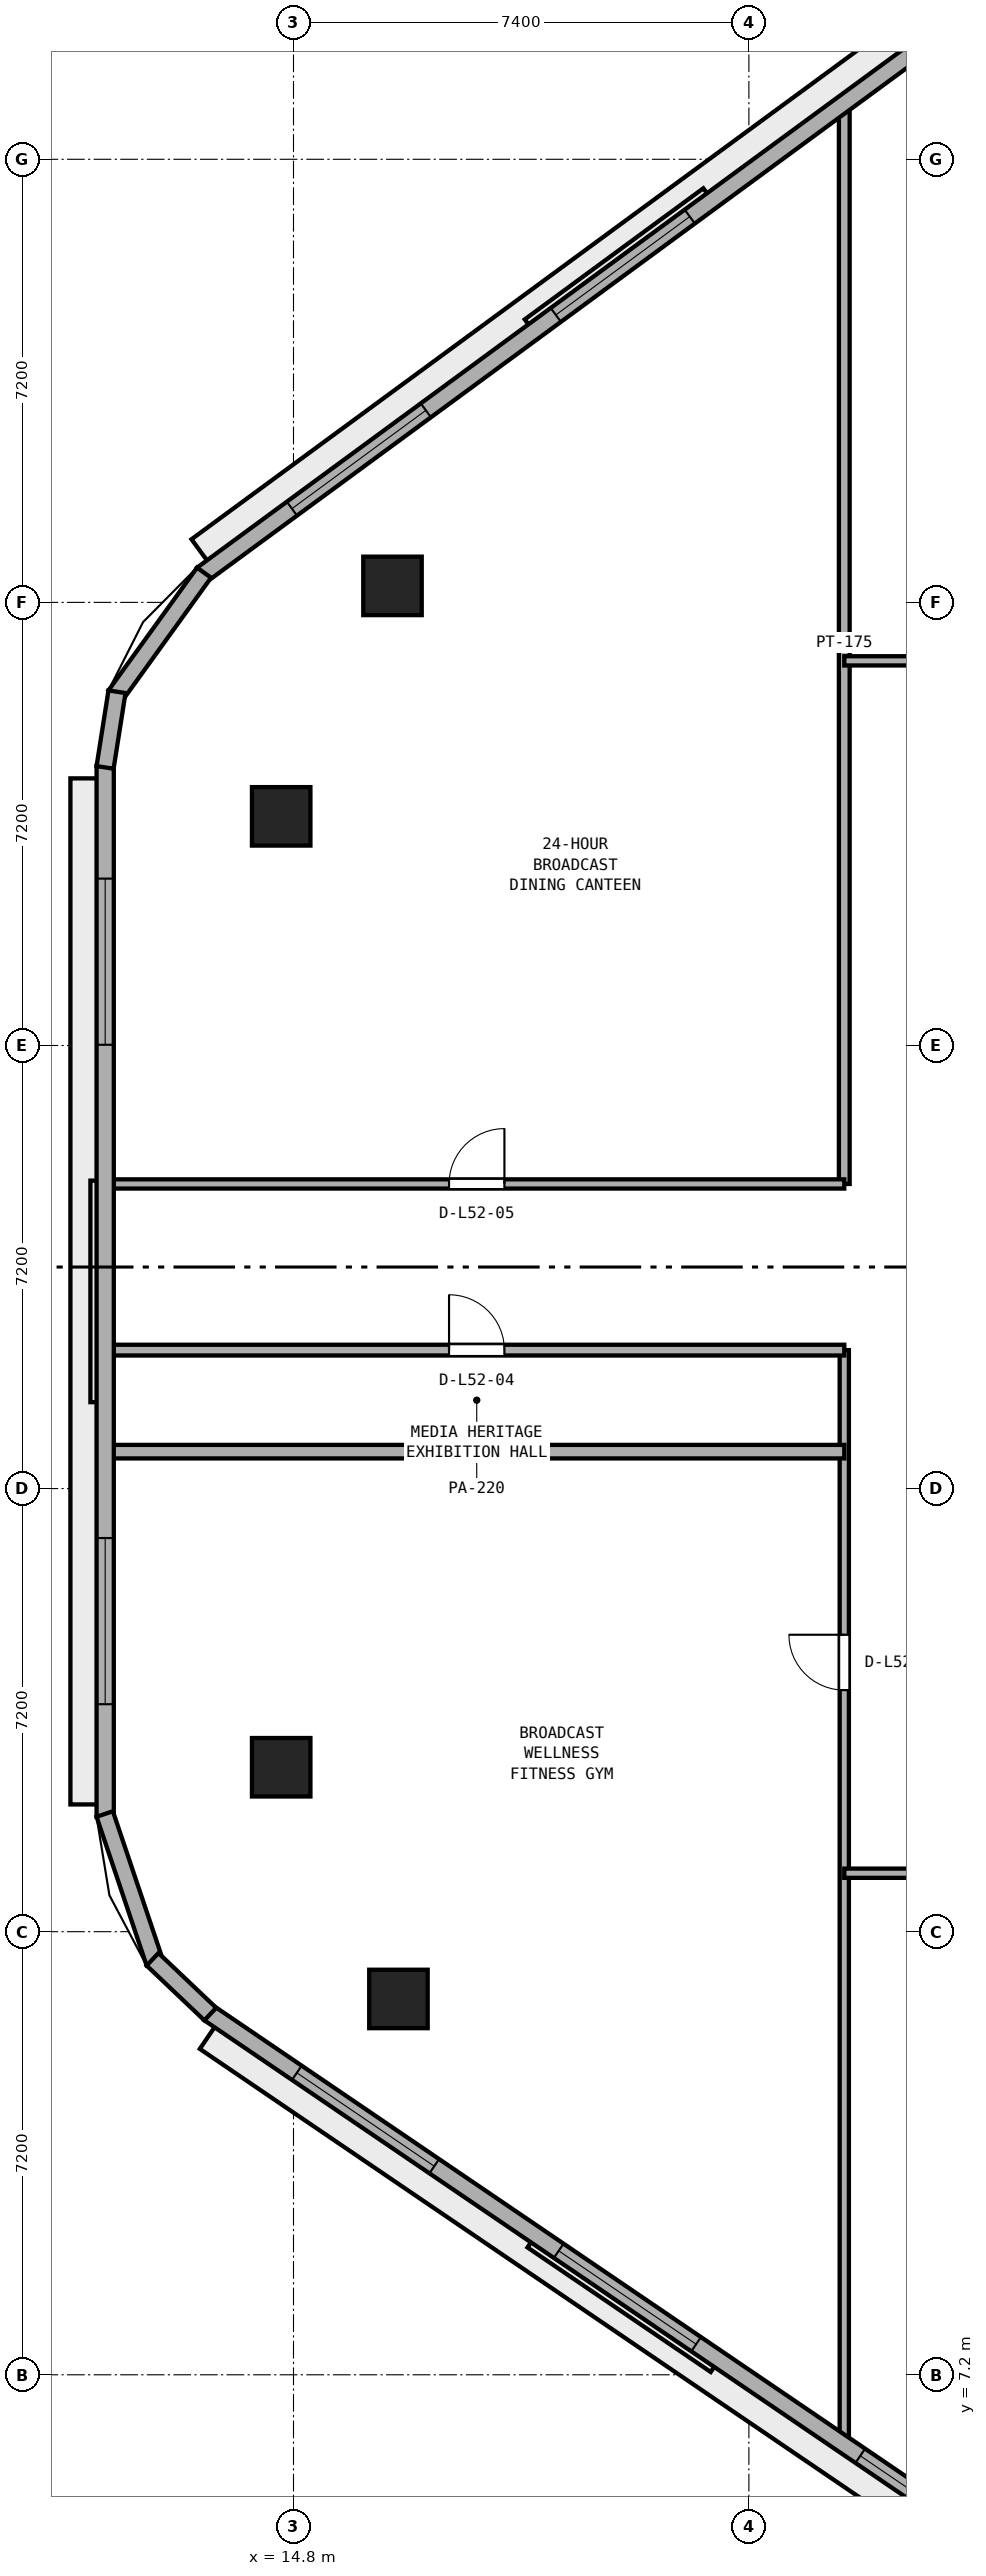
"""IFC4 building model, lengths in metres.
Left out: names, types, materials, properties, quantities, classifications, styles, units other than length and angle.
Written with IfcOpenShell. Run it as: python <this file> out.ifc"""

import sys

from ifc_helpers import new_model, si_unit, direction, frame, frame_2d, origin, origin_2d, place, context, subcontext, project, spatial, rectangle, extrude, element, fill, save


model = new_model("IFC4")
c1 = context("Model", 3, precision=1e-05, world=origin(), true_north=direction((0.0, 1.0)))
c2 = subcontext(c1, "Body", "Model", "MODEL_VIEW")
j1 = project(units=[si_unit("LENGTHUNIT", "METRE"), si_unit("PLANEANGLEUNIT", "RADIAN")], contexts=[c1])
p1 = place(None, origin())
s1 = spatial("IfcSite", under=j1, at=p1, CompositionType="ELEMENT")
p2 = place(p1, origin())
s2 = spatial("IfcBuilding", under=s1, at=p2, CompositionType="ELEMENT")
p3 = place(p2, frame((0.0, 0.0, 204.8)))
s3 = spatial("IfcBuildingStorey", under=s2, at=p3, CompositionType="ELEMENT", Elevation=204.8)
for number, where, z_axis, x_axis in (
    (1, (16.409, 36.268, 0.0), (0.0, 0.0, 1.0), (1.0, 0.0, 0.0)),
    (2, (14.6, 32.523, 0.0), (0.0, 0.0, 1.0), (1.0, 0.0, 0.0)),
    (3, (14.6, 17.072, 0.0), (0.0, 0.0, 1.0), (1.0, 0.0, 0.0)),
    (4, (16.505, 13.307, 0.0), (0.0, 0.0, 1.0), (1.0, 0.0, 0.0)),
):
    element("IfcColumn", number, at=place(p3, frame(where, z_axis=z_axis, x_axis=x_axis)), inside=s3, PredefinedType="COLUMN", context=c2, shape_type="SweptSolid", body=[
        extrude(rectangle(XDim=0.95, YDim=0.95, at=origin_2d()), origin(), (0.0, 0.0, 1.0), 3.8),
    ])
p4 = place(p3, frame((23.75, 6.031, 0.0), z_axis=(0.0, 0.0, 1.0), x_axis=(0.0, 1.0, 0.0)))
e5 = element("IfcWall", 5, at=p4, inside=s3, PredefinedType="PARTITIONING", context=c2, shape_type="SweptSolid", body=[
    extrude(rectangle(XDim=17.819, YDim=0.15, at=frame_2d((8.91, 0.0))), origin(), (0.0, 0.0, 1.0), 3.54),
])
p5 = place(p4, frame((12.294, 0.0, 0.0)))
e6 = element("IfcOpeningElement", 6, at=p5, cuts=e5, PredefinedType="OPENING", context=c2, shape_type="SweptSolid", body=[
    extrude(rectangle(XDim=0.9, YDim=2.1, at=frame_2d((0.45, 1.05))), frame((0.0, 0.085, 0.0), z_axis=(0.0, -1.0, 0.0), x_axis=(1.0, 0.0, 0.0)), (0.0, 0.0, 1.0), 0.17),
])
p6 = place(p3, frame((23.75, 26.55, 0.0), z_axis=(0.0, 0.0, 1.0), x_axis=(0.0, 1.0, 0.0)))
e7 = element("IfcWall", 7, at=p6, inside=s3, PredefinedType="PARTITIONING", context=c2, shape_type="SweptSolid", body=[
    extrude(rectangle(XDim=17.596, YDim=0.175, at=frame_2d((8.798, 0.0))), origin(), (0.0, 0.0, 1.0), 3.54),
])
p7 = place(p3, frame((23.75, 15.35, 0.0), z_axis=(0.0, 0.0, 1.0), x_axis=(1.0, 0.0, 0.0)))
e8 = element("IfcWall", 8, at=p7, inside=s3, PredefinedType="PARTITIONING", context=c2, shape_type="SweptSolid", body=[
    extrude(rectangle(XDim=10.65, YDim=0.15, at=frame_2d((5.325, 0.0))), origin(), (0.0, 0.0, 1.0), 3.54),
])
p8 = place(p7, frame((4.875, 0.0, 0.0)))
e9 = element("IfcOpeningElement", 9, at=p8, cuts=e8, PredefinedType="OPENING", context=c2, shape_type="SweptSolid", body=[
    extrude(rectangle(XDim=0.9, YDim=2.1, at=frame_2d((0.45, 1.05))), frame((0.0, 0.085, 0.0), z_axis=(0.0, -1.0, 0.0), x_axis=(1.0, 0.0, 0.0)), (0.0, 0.0, 1.0), 0.17),
])
p9 = place(p3, frame((11.805, 22.2, 0.0), z_axis=(0.0, 0.0, 1.0), x_axis=(1.0, 0.0, 0.0)))
e10 = element("IfcWall", 10, at=p9, inside=s3, PredefinedType="PARTITIONING", context=c2, shape_type="SweptSolid", body=[
    extrude(rectangle(XDim=11.945, YDim=0.22, at=frame_2d((5.973, 0.0))), origin(), (0.0, 0.0, 1.0), 3.54),
])
p10 = place(p3, frame((11.805, 23.85, 0.0), z_axis=(0.0, 0.0, 1.0), x_axis=(1.0, 0.0, 0.0)))
e11 = element("IfcWall", 11, at=p10, inside=s3, PredefinedType="PARTITIONING", context=c2, shape_type="SweptSolid", body=[
    extrude(rectangle(XDim=11.945, YDim=0.175, at=frame_2d((5.973, 0.0))), origin(), (0.0, 0.0, 1.0), 3.54),
])
p11 = place(p10, frame((5.522, 0.0, 0.0)))
e12 = element("IfcOpeningElement", 12, at=p11, cuts=e11, PredefinedType="OPENING", context=c2, shape_type="SweptSolid", body=[
    extrude(rectangle(XDim=0.9, YDim=2.1, at=frame_2d((0.45, 1.05))), frame((0.0, 0.097, 0.0), z_axis=(0.0, -1.0, 0.0), x_axis=(1.0, 0.0, 0.0)), (0.0, 0.0, 1.0), 0.195),
])
p12 = place(p3, frame((11.805, 26.55, 0.0), z_axis=(0.0, 0.0, 1.0), x_axis=(1.0, 0.0, 0.0)))
e13 = element("IfcWall", 13, at=p12, inside=s3, PredefinedType="PARTITIONING", context=c2, shape_type="SweptSolid", body=[
    extrude(rectangle(XDim=11.945, YDim=0.15, at=frame_2d((5.973, 0.0))), origin(), (0.0, 0.0, 1.0), 3.54),
])
p13 = place(p12, frame((5.522, 0.0, 0.0)))
e14 = element("IfcOpeningElement", 14, at=p13, cuts=e13, PredefinedType="OPENING", context=c2, shape_type="SweptSolid", body=[
    extrude(rectangle(XDim=0.9, YDim=2.1, at=frame_2d((0.45, 1.05))), frame((0.0, 0.085, 0.0), z_axis=(0.0, -1.0, 0.0), x_axis=(1.0, 0.0, 0.0)), (0.0, 0.0, 1.0), 0.17),
])
p14 = place(p3, frame((23.75, 35.05, 0.0), z_axis=(0.0, 0.0, 1.0), x_axis=(1.0, 0.0, 0.0)))
e15 = element("IfcWall", 15, at=p14, inside=s3, PredefinedType="PARTITIONING", context=c2, shape_type="SweptSolid", body=[
    extrude(rectangle(XDim=26.5, YDim=0.15, at=frame_2d((13.25, 0.0))), origin(), (0.0, 0.0, 1.0), 3.54),
])
p15 = place(p14, frame((12.8, 0.0, 0.0)))
e16 = element("IfcOpeningElement", 16, at=p15, cuts=e15, PredefinedType="OPENING", context=c2, shape_type="SweptSolid", body=[
    extrude(rectangle(XDim=0.9, YDim=2.1, at=frame_2d((0.45, 1.05))), frame((0.0, 0.085, 0.0), z_axis=(0.0, -1.0, 0.0), x_axis=(1.0, 0.0, 0.0)), (0.0, 0.0, 1.0), 0.17),
])
p16 = place(p3, frame((26.986, 46.488, 0.0), z_axis=(0.0, 0.0, 1.0), x_axis=(-0.806097783211, -0.59178236194, 0.0)))
e17 = element("IfcWall", 17, at=p16, inside=s3, PredefinedType="STANDARD", context=c2, shape_type="SweptSolid", body=[
    extrude(rectangle(XDim=16.959, YDim=0.28, at=frame_2d((8.479, 0.0))), origin(), (0.0, 0.0, 1.0), 3.54),
])
p17 = place(p16, frame((7.129, 0.0, 0.9)))
e18 = element("IfcOpeningElement", 18, at=p17, cuts=e17, PredefinedType="OPENING", context=c2, shape_type="SweptSolid", body=[
    extrude(rectangle(XDim=2.7, YDim=1.75, at=frame_2d((1.35, 0.875))), frame((0.0, 0.15, 0.0), z_axis=(0.0, -1.0, 0.0), x_axis=(1.0, 0.0, 0.0)), (0.0, 0.0, 1.0), 0.3),
])
p18 = place(p16, frame((12.449, 0.0, 0.9)))
e19 = element("IfcOpeningElement", 19, at=p18, cuts=e17, PredefinedType="OPENING", context=c2, shape_type="SweptSolid", body=[
    extrude(rectangle(XDim=2.7, YDim=1.75, at=frame_2d((1.35, 0.875))), frame((0.0, 0.15, 0.0), z_axis=(0.0, -1.0, 0.0), x_axis=(1.0, 0.0, 0.0)), (0.0, 0.0, 1.0), 0.3),
])
p19 = place(p3, frame((11.74, 33.34, 0.0), z_axis=(0.0, 0.0, 1.0), x_axis=(0.0, -1.0, 0.0)))
e20 = element("IfcWall", 20, at=p19, inside=s3, PredefinedType="STANDARD", context=c2, shape_type="SweptSolid", body=[
    extrude(rectangle(XDim=17.073, YDim=0.28, at=frame_2d((8.536, 0.0))), origin(), (0.0, 0.0, 1.0), 3.54),
])
p20 = place(p19, frame((1.829, 0.0, 0.9)))
e21 = element("IfcOpeningElement", 21, at=p20, cuts=e20, PredefinedType="OPENING", context=c2, shape_type="SweptSolid", body=[
    extrude(rectangle(XDim=2.7, YDim=1.75, at=frame_2d((1.35, 0.875))), frame((0.0, 0.15, 0.0), z_axis=(0.0, -1.0, 0.0), x_axis=(1.0, 0.0, 0.0)), (0.0, 0.0, 1.0), 0.3),
])
p21 = place(p19, frame((12.544, 0.0, 0.9)))
e22 = element("IfcOpeningElement", 22, at=p21, cuts=e20, PredefinedType="OPENING", context=c2, shape_type="SweptSolid", body=[
    extrude(rectangle(XDim=2.7, YDim=1.75, at=frame_2d((1.35, 0.875))), frame((0.0, 0.15, 0.0), z_axis=(0.0, -1.0, 0.0), x_axis=(1.0, 0.0, 0.0)), (0.0, 0.0, 1.0), 0.3),
])
p22 = place(p3, frame((13.43, 13.075, 0.0), z_axis=(0.0, 0.0, 1.0), x_axis=(0.827025402003, -0.562164552815, 0.0)))
e23 = element("IfcWall", 23, at=p22, inside=s3, PredefinedType="STANDARD", context=c2, shape_type="SweptSolid", body=[
    extrude(rectangle(XDim=16.435, YDim=0.28, at=frame_2d((8.218, 0.0))), origin(), (0.0, 0.0, 1.0), 3.54),
])
p23 = place(p22, frame((1.722, 0.0, 0.9)))
e24 = element("IfcOpeningElement", 24, at=p23, cuts=e23, PredefinedType="OPENING", context=c2, shape_type="SweptSolid", body=[
    extrude(rectangle(XDim=2.7, YDim=1.75, at=frame_2d((1.35, 0.875))), frame((0.0, 0.15, 0.0), z_axis=(0.0, -1.0, 0.0), x_axis=(1.0, 0.0, 0.0)), (0.0, 0.0, 1.0), 0.3),
])
p24 = place(p22, frame((6.868, 0.0, 0.9)))
e25 = element("IfcOpeningElement", 25, at=p24, cuts=e23, PredefinedType="OPENING", context=c2, shape_type="SweptSolid", body=[
    extrude(rectangle(XDim=2.7, YDim=1.75, at=frame_2d((1.35, 0.875))), frame((0.0, 0.15, 0.0), z_axis=(0.0, -1.0, 0.0), x_axis=(1.0, 0.0, 0.0)), (0.0, 0.0, 1.0), 0.3),
])
p25 = place(p22, frame((12.793, 0.0, 0.9)))
e26 = element("IfcOpeningElement", 26, at=p25, cuts=e23, PredefinedType="OPENING", context=c2, shape_type="SweptSolid", body=[
    extrude(rectangle(XDim=2.7, YDim=1.75, at=frame_2d((1.35, 0.875))), frame((0.0, 0.15, 0.0), z_axis=(0.0, -1.0, 0.0), x_axis=(1.0, 0.0, 0.0)), (0.0, 0.0, 1.0), 0.3),
])
p26 = place(p3, frame((13.346, 36.483, 0.0), z_axis=(0.0, 0.0, 1.0), x_axis=(-0.585128091556, -0.810940883463, 0.0)))
e27 = element("IfcWall", 27, at=p26, inside=s3, PredefinedType="STANDARD", context=c2, shape_type="SweptSolid", body=[
    extrude(rectangle(XDim=2.46, YDim=0.28, at=frame_2d((1.23, 0.0))), origin(), (0.0, 0.0, 1.0), 3.54),
])
p27 = place(p3, frame((11.932, 34.548, 0.0), z_axis=(0.0, 0.0, 1.0), x_axis=(-0.155519443181, -0.987832831401, 0.0)))
e28 = element("IfcWall", 28, at=p27, inside=s3, PredefinedType="STANDARD", context=c2, shape_type="SweptSolid", body=[
    extrude(rectangle(XDim=1.245, YDim=0.28, at=frame_2d((0.623, 0.0))), origin(), (0.0, 0.0, 1.0), 3.54),
])
p28 = place(p3, frame((11.733, 16.312, 0.0), z_axis=(0.0, 0.0, 1.0), x_axis=(0.318924860995, -0.947780002447, 0.0)))
e29 = element("IfcWall", 29, at=p28, inside=s3, PredefinedType="STANDARD", context=c2, shape_type="SweptSolid", body=[
    extrude(rectangle(XDim=2.552, YDim=0.28, at=frame_2d((1.276, 0.0))), origin(), (0.0, 0.0, 1.0), 3.54),
])
p29 = place(p3, frame((12.51, 13.951, 0.0), z_axis=(0.0, 0.0, 1.0), x_axis=(0.725371815671, -0.688357268451, 0.0)))
e30 = element("IfcWall", 30, at=p29, inside=s3, PredefinedType="STANDARD", context=c2, shape_type="SweptSolid", body=[
    extrude(rectangle(XDim=1.293, YDim=0.28, at=frame_2d((0.646, 0.0))), origin(), (0.0, 0.0, 1.0), 3.54),
])
p30 = place(p5, origin())
e31 = element("IfcDoor", 31, at=p30, inside=s3, OperationType="SINGLE_SWING_RIGHT", PredefinedType="DOOR", context=c2, shape_type="SweptSolid", body=[
    extrude(rectangle(XDim=0.9, YDim=2.1, at=frame_2d((0.45, 1.05))), frame((0.0, 0.025, 0.0), z_axis=(0.0, -1.0, 0.0), x_axis=(1.0, 0.0, 0.0)), (0.0, 0.0, 1.0), 0.05),
])
fill(e6, e31)
p31 = place(p11, origin())
e32 = element("IfcDoor", 32, at=p31, inside=s3, OperationType="SINGLE_SWING_LEFT", PredefinedType="DOOR", context=c2, shape_type="SweptSolid", body=[
    extrude(rectangle(XDim=0.9, YDim=2.1, at=frame_2d((0.45, 1.05))), frame((0.0, 0.025, 0.0), z_axis=(0.0, -1.0, 0.0), x_axis=(1.0, 0.0, 0.0)), (0.0, 0.0, 1.0), 0.05),
])
fill(e12, e32)
p32 = place(p13, origin())
e33 = element("IfcDoor", 33, at=p32, inside=s3, OperationType="SINGLE_SWING_RIGHT", PredefinedType="DOOR", context=c2, shape_type="SweptSolid", body=[
    extrude(rectangle(XDim=0.9, YDim=2.1, at=frame_2d((0.45, 1.05))), frame((0.0, 0.025, 0.0), z_axis=(0.0, -1.0, 0.0), x_axis=(1.0, 0.0, 0.0)), (0.0, 0.0, 1.0), 0.05),
])
fill(e14, e33)
p33 = place(p17, origin())
e34 = element("IfcWindow", 34, at=p33, inside=s3, PartitioningType="SINGLE_PANEL", PredefinedType="WINDOW", context=c2, shape_type="SweptSolid", body=[
    extrude(rectangle(XDim=2.7, YDim=1.75, at=frame_2d((1.35, 0.875))), frame((0.0, 0.03, 0.0), z_axis=(0.0, -1.0, 0.0), x_axis=(1.0, 0.0, 0.0)), (0.0, 0.0, 1.0), 0.06),
])
fill(e18, e34)
p34 = place(p18, origin())
e35 = element("IfcWindow", 35, at=p34, inside=s3, PartitioningType="SINGLE_PANEL", PredefinedType="WINDOW", context=c2, shape_type="SweptSolid", body=[
    extrude(rectangle(XDim=2.7, YDim=1.75, at=frame_2d((1.35, 0.875))), frame((0.0, 0.03, 0.0), z_axis=(0.0, -1.0, 0.0), x_axis=(1.0, 0.0, 0.0)), (0.0, 0.0, 1.0), 0.06),
])
fill(e19, e35)
p35 = place(p20, origin())
e36 = element("IfcWindow", 36, at=p35, inside=s3, PartitioningType="SINGLE_PANEL", PredefinedType="WINDOW", context=c2, shape_type="SweptSolid", body=[
    extrude(rectangle(XDim=2.7, YDim=1.75, at=frame_2d((1.35, 0.875))), frame((0.0, 0.03, 0.0), z_axis=(0.0, -1.0, 0.0), x_axis=(1.0, 0.0, 0.0)), (0.0, 0.0, 1.0), 0.06),
])
fill(e21, e36)
p36 = place(p21, origin())
e37 = element("IfcWindow", 37, at=p36, inside=s3, PartitioningType="SINGLE_PANEL", PredefinedType="WINDOW", context=c2, shape_type="SweptSolid", body=[
    extrude(rectangle(XDim=2.7, YDim=1.75, at=frame_2d((1.35, 0.875))), frame((0.0, 0.03, 0.0), z_axis=(0.0, -1.0, 0.0), x_axis=(1.0, 0.0, 0.0)), (0.0, 0.0, 1.0), 0.06),
])
fill(e22, e37)
p37 = place(p23, origin())
e38 = element("IfcWindow", 38, at=p37, inside=s3, PartitioningType="SINGLE_PANEL", PredefinedType="WINDOW", context=c2, shape_type="SweptSolid", body=[
    extrude(rectangle(XDim=2.7, YDim=1.75, at=frame_2d((1.35, 0.875))), frame((0.0, 0.03, 0.0), z_axis=(0.0, -1.0, 0.0), x_axis=(1.0, 0.0, 0.0)), (0.0, 0.0, 1.0), 0.06),
])
fill(e24, e38)
p38 = place(p24, origin())
e39 = element("IfcWindow", 39, at=p38, inside=s3, PartitioningType="SINGLE_PANEL", PredefinedType="WINDOW", context=c2, shape_type="SweptSolid", body=[
    extrude(rectangle(XDim=2.7, YDim=1.75, at=frame_2d((1.35, 0.875))), frame((0.0, 0.03, 0.0), z_axis=(0.0, -1.0, 0.0), x_axis=(1.0, 0.0, 0.0)), (0.0, 0.0, 1.0), 0.06),
])
fill(e25, e39)
p39 = place(p25, origin())
e40 = element("IfcWindow", 40, at=p39, inside=s3, PartitioningType="SINGLE_PANEL", PredefinedType="WINDOW", context=c2, shape_type="SweptSolid", body=[
    extrude(rectangle(XDim=2.7, YDim=1.75, at=frame_2d((1.35, 0.875))), frame((0.0, 0.03, 0.0), z_axis=(0.0, -1.0, 0.0), x_axis=(1.0, 0.0, 0.0)), (0.0, 0.0, 1.0), 0.06),
])
fill(e26, e40)
save(model, sys.argv[1])
